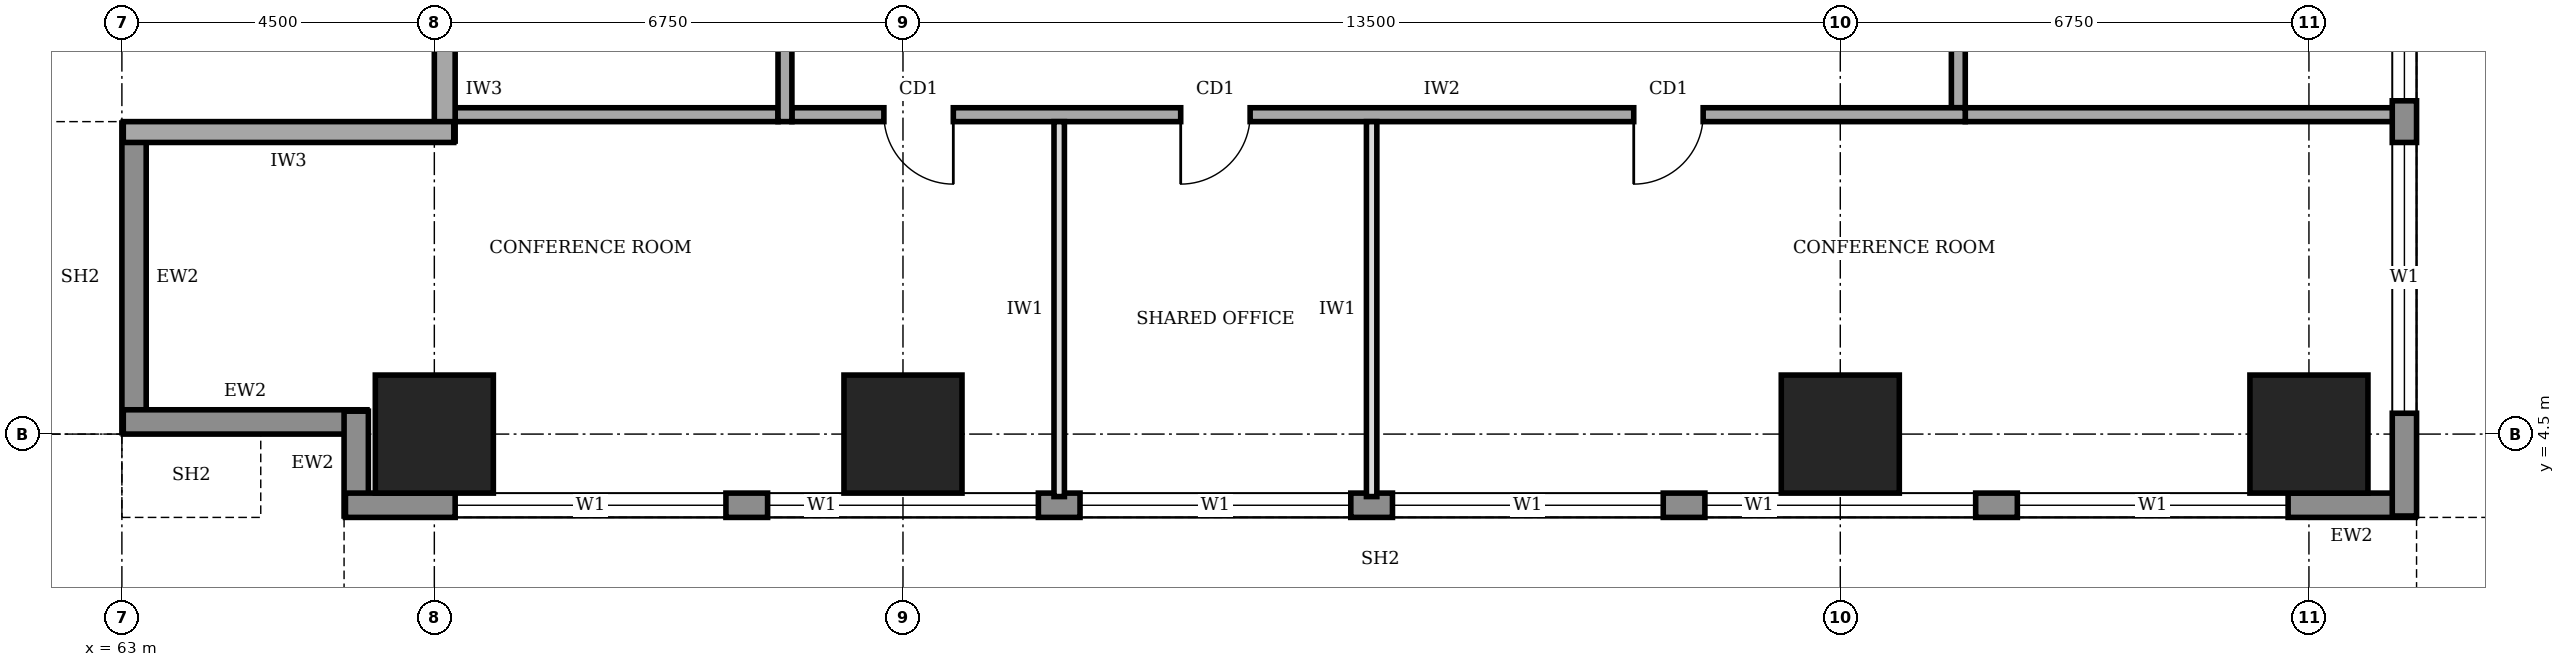
"""IFC4 building model, lengths in metres.
Left out: names, types, materials, properties, quantities, classifications, styles, units other than length and angle.
Written with IfcOpenShell. Run it as: python <this file> out.ifc"""

import sys

from ifc_helpers import new_model, si_unit, direction, frame, frame_2d, origin, origin_2d, place, context, subcontext, project, spatial, rectangle, extrude, element, fill, save


model = new_model("IFC4")
c1 = context("Model", 3, precision=1e-05, world=origin(), true_north=direction((0.0, 1.0)))
c2 = subcontext(c1, "Body", "Model", "MODEL_VIEW")
j1 = project(units=[si_unit("LENGTHUNIT", "METRE"), si_unit("PLANEANGLEUNIT", "RADIAN")], contexts=[c1])
p1 = place(None, origin())
s1 = spatial("IfcSite", under=j1, at=p1, CompositionType="ELEMENT")
p2 = place(p1, origin())
s2 = spatial("IfcBuilding", under=s1, at=p2, CompositionType="ELEMENT")
p3 = place(p2, frame((0.0, 0.0, 129.0)))
s3 = spatial("IfcBuildingStorey", under=s2, at=p3, CompositionType="ELEMENT", Elevation=129.0)
for number, where, z_axis, x_axis in (
    (1, (67.5, 4.5, 0.0), (0.0, 0.0, 1.0), (1.0, 0.0, 0.0)),
    (2, (74.25, 4.5, 0.0), (0.0, 0.0, 1.0), (1.0, 0.0, 0.0)),
    (3, (87.75, 4.5, 0.0), (0.0, 0.0, 1.0), (1.0, 0.0, 0.0)),
    (4, (94.5, 4.5, 0.0), (0.0, 0.0, 1.0), (1.0, 0.0, 0.0)),
):
    element("IfcColumn", number, at=place(p3, frame(where, z_axis=z_axis, x_axis=x_axis)), inside=s3, PredefinedType="COLUMN", context=c2, shape_type="SweptSolid", body=[
        extrude(rectangle(XDim=1.7, YDim=1.7, at=origin_2d()), origin(), (0.0, 0.0, 1.0), 4.0),
    ])
p4 = place(p3, frame((63.175, 8.98, 0.0), z_axis=(0.0, 0.0, 1.0), x_axis=(0.0, -1.0, 0.0)))
e5 = element("IfcWall", 5, at=p4, inside=s3, PredefinedType="STANDARD", context=c2, shape_type="SweptSolid", body=[
    extrude(rectangle(XDim=4.46, YDim=0.35, at=frame_2d((2.23, 0.0))), origin(), (0.0, 0.0, 1.0), 3.75),
])
p5 = place(p3, frame((63.02, 4.675, 0.0), z_axis=(0.0, 0.0, 1.0), x_axis=(1.0, 0.0, 0.0)))
e6 = element("IfcWall", 6, at=p5, inside=s3, PredefinedType="STANDARD", context=c2, shape_type="SweptSolid", body=[
    extrude(rectangle(XDim=3.51, YDim=0.35, at=frame_2d((1.755, 0.0))), origin(), (0.0, 0.0, 1.0), 2.85),
])
p6 = place(p3, frame((66.375, 4.83, 0.0), z_axis=(0.0, 0.0, 1.0), x_axis=(0.0, -1.0, 0.0)))
e7 = element("IfcWall", 7, at=p6, inside=s3, PredefinedType="STANDARD", context=c2, shape_type="SweptSolid", body=[
    extrude(rectangle(XDim=1.51, YDim=0.35, at=frame_2d((0.755, 0.0))), origin(), (0.0, 0.0, 1.0), 3.75),
])
p7 = place(p3, frame((66.22, 3.475, 0.0), z_axis=(0.0, 0.0, 1.0), x_axis=(1.0, 0.0, 0.0)))
e8 = element("IfcWall", 8, at=p7, inside=s3, PredefinedType="STANDARD", context=c2, shape_type="SweptSolid", body=[
    extrude(rectangle(XDim=29.81, YDim=0.35, at=frame_2d((14.905, 0.0))), origin(), (0.0, 0.0, 1.0), 3.75),
])
p8 = place(p7, frame((1.58, 0.0, 0.9)))
e9 = element("IfcOpeningElement", 9, at=p8, cuts=e8, PredefinedType="OPENING", context=c2, shape_type="SweptSolid", body=[
    extrude(rectangle(XDim=3.9, YDim=2.2, at=frame_2d((1.95, 1.1))), frame((0.0, 0.185, 0.0), z_axis=(0.0, -1.0, 0.0), x_axis=(1.0, 0.0, 0.0)), (0.0, 0.0, 1.0), 0.37),
])
p9 = place(p7, frame((6.08, 0.0, 0.9)))
e10 = element("IfcOpeningElement", 10, at=p9, cuts=e8, PredefinedType="OPENING", context=c2, shape_type="SweptSolid", body=[
    extrude(rectangle(XDim=3.9, YDim=2.2, at=frame_2d((1.95, 1.1))), frame((0.0, 0.185, 0.0), z_axis=(0.0, -1.0, 0.0), x_axis=(1.0, 0.0, 0.0)), (0.0, 0.0, 1.0), 0.37),
])
p10 = place(p7, frame((10.58, 0.0, 0.9)))
e11 = element("IfcOpeningElement", 11, at=p10, cuts=e8, PredefinedType="OPENING", context=c2, shape_type="SweptSolid", body=[
    extrude(rectangle(XDim=3.9, YDim=2.2, at=frame_2d((1.95, 1.1))), frame((0.0, 0.185, 0.0), z_axis=(0.0, -1.0, 0.0), x_axis=(1.0, 0.0, 0.0)), (0.0, 0.0, 1.0), 0.37),
])
p11 = place(p7, frame((15.08, 0.0, 0.9)))
e12 = element("IfcOpeningElement", 12, at=p11, cuts=e8, PredefinedType="OPENING", context=c2, shape_type="SweptSolid", body=[
    extrude(rectangle(XDim=3.9, YDim=2.2, at=frame_2d((1.95, 1.1))), frame((0.0, 0.185, 0.0), z_axis=(0.0, -1.0, 0.0), x_axis=(1.0, 0.0, 0.0)), (0.0, 0.0, 1.0), 0.37),
])
p12 = place(p7, frame((19.58, 0.0, 0.9)))
e13 = element("IfcOpeningElement", 13, at=p12, cuts=e8, PredefinedType="OPENING", context=c2, shape_type="SweptSolid", body=[
    extrude(rectangle(XDim=3.9, YDim=2.2, at=frame_2d((1.95, 1.1))), frame((0.0, 0.185, 0.0), z_axis=(0.0, -1.0, 0.0), x_axis=(1.0, 0.0, 0.0)), (0.0, 0.0, 1.0), 0.37),
])
p13 = place(p7, frame((24.08, 0.0, 0.9)))
e14 = element("IfcOpeningElement", 14, at=p13, cuts=e8, PredefinedType="OPENING", context=c2, shape_type="SweptSolid", body=[
    extrude(rectangle(XDim=3.9, YDim=2.2, at=frame_2d((1.95, 1.1))), frame((0.0, 0.185, 0.0), z_axis=(0.0, -1.0, 0.0), x_axis=(1.0, 0.0, 0.0)), (0.0, 0.0, 1.0), 0.37),
])
p14 = place(p3, frame((95.875, 3.32, 0.0), z_axis=(0.0, 0.0, 1.0), x_axis=(0.0, 1.0, 0.0)))
e15 = element("IfcWall", 15, at=p14, inside=s3, PredefinedType="STANDARD", context=c2, shape_type="SweptSolid", body=[
    extrude(rectangle(XDim=33.96, YDim=0.35, at=frame_2d((16.98, 0.0))), origin(), (0.0, 0.0, 1.0), 3.75),
])
p15 = place(p14, frame((1.48, 0.0, 0.9)))
e16 = element("IfcOpeningElement", 16, at=p15, cuts=e15, PredefinedType="OPENING", context=c2, shape_type="SweptSolid", body=[
    extrude(rectangle(XDim=3.9, YDim=2.2, at=frame_2d((1.95, 1.1))), frame((0.0, 0.185, 0.0), z_axis=(0.0, -1.0, 0.0), x_axis=(1.0, 0.0, 0.0)), (0.0, 0.0, 1.0), 0.37),
])
p16 = place(p14, frame((5.98, 0.0, 0.9)))
e17 = element("IfcOpeningElement", 17, at=p16, cuts=e15, PredefinedType="OPENING", context=c2, shape_type="SweptSolid", body=[
    extrude(rectangle(XDim=3.9, YDim=2.2, at=frame_2d((1.95, 1.1))), frame((0.0, 0.185, 0.0), z_axis=(0.0, -1.0, 0.0), x_axis=(1.0, 0.0, 0.0)), (0.0, 0.0, 1.0), 0.37),
])
p17 = place(p14, frame((10.48, 0.0, 0.9)))
e18 = element("IfcOpeningElement", 18, at=p17, cuts=e15, PredefinedType="OPENING", context=c2, shape_type="SweptSolid", body=[
    extrude(rectangle(XDim=3.9, YDim=2.2, at=frame_2d((1.95, 1.1))), frame((0.0, 0.185, 0.0), z_axis=(0.0, -1.0, 0.0), x_axis=(1.0, 0.0, 0.0)), (0.0, 0.0, 1.0), 0.37),
])
p18 = place(p14, frame((14.98, 0.0, 0.9)))
e19 = element("IfcOpeningElement", 19, at=p18, cuts=e15, PredefinedType="OPENING", context=c2, shape_type="SweptSolid", body=[
    extrude(rectangle(XDim=3.9, YDim=2.2, at=frame_2d((1.95, 1.1))), frame((0.0, 0.185, 0.0), z_axis=(0.0, -1.0, 0.0), x_axis=(1.0, 0.0, 0.0)), (0.0, 0.0, 1.0), 0.37),
])
p19 = place(p14, frame((19.48, 0.0, 0.9)))
e20 = element("IfcOpeningElement", 20, at=p19, cuts=e15, PredefinedType="OPENING", context=c2, shape_type="SweptSolid", body=[
    extrude(rectangle(XDim=3.9, YDim=2.2, at=frame_2d((1.95, 1.1))), frame((0.0, 0.185, 0.0), z_axis=(0.0, -1.0, 0.0), x_axis=(1.0, 0.0, 0.0)), (0.0, 0.0, 1.0), 0.37),
])
p20 = place(p14, frame((23.98, 0.0, 0.9)))
e21 = element("IfcOpeningElement", 21, at=p20, cuts=e15, PredefinedType="OPENING", context=c2, shape_type="SweptSolid", body=[
    extrude(rectangle(XDim=3.9, YDim=2.2, at=frame_2d((1.95, 1.1))), frame((0.0, 0.185, 0.0), z_axis=(0.0, -1.0, 0.0), x_axis=(1.0, 0.0, 0.0)), (0.0, 0.0, 1.0), 0.37),
])
p21 = place(p14, frame((28.48, 0.0, 0.9)))
e22 = element("IfcOpeningElement", 22, at=p21, cuts=e15, PredefinedType="OPENING", context=c2, shape_type="SweptSolid", body=[
    extrude(rectangle(XDim=3.9, YDim=2.2, at=frame_2d((1.95, 1.1))), frame((0.0, 0.185, 0.0), z_axis=(0.0, -1.0, 0.0), x_axis=(1.0, 0.0, 0.0)), (0.0, 0.0, 1.0), 0.37),
])
p22 = place(p3, frame((67.65, 10.2, 0.0), z_axis=(0.0, 0.0, 1.0), x_axis=(0.0, -1.0, 0.0)))
e23 = element("IfcWall", 23, at=p22, inside=s3, PredefinedType="SOLIDWALL", context=c2, shape_type="SweptSolid", body=[
    extrude(rectangle(XDim=1.48, YDim=0.3, at=frame_2d((0.74, 0.0))), origin(), (0.0, 0.0, 1.0), 2.65),
])
p23 = place(p3, frame((67.78, 8.85, 0.0), z_axis=(0.0, 0.0, 1.0), x_axis=(-1.0, 0.0, 0.0)))
e24 = element("IfcWall", 24, at=p23, inside=s3, PredefinedType="SOLIDWALL", context=c2, shape_type="SweptSolid", body=[
    extrude(rectangle(XDim=4.76, YDim=0.3, at=frame_2d((2.38, 0.0))), origin(), (0.0, 0.0, 1.0), 3.75),
])
p24 = place(p3, frame((72.65, 9.1, 0.0), z_axis=(0.0, 0.0, 1.0), x_axis=(1.0, 0.0, 0.0)))
e25 = element("IfcWall", 25, at=p24, inside=s3, PredefinedType="SOLIDWALL", context=c2, shape_type="SweptSolid", body=[
    extrude(rectangle(XDim=16.9, YDim=0.2, at=frame_2d((8.45, 0.0))), origin(), (0.0, 0.0, 1.0), 3.75),
])
p25 = place(p24, frame((1.325, 0.0, 0.0)))
e26 = element("IfcOpeningElement", 26, at=p25, cuts=e25, PredefinedType="OPENING", context=c2, shape_type="SweptSolid", body=[
    extrude(rectangle(XDim=1.0, YDim=2.1, at=frame_2d((0.5, 1.05))), frame((0.0, 0.11, 0.0), z_axis=(0.0, -1.0, 0.0), x_axis=(1.0, 0.0, 0.0)), (0.0, 0.0, 1.0), 0.22),
])
p26 = place(p24, frame((5.6, 0.0, 0.0)))
e27 = element("IfcOpeningElement", 27, at=p26, cuts=e25, PredefinedType="OPENING", context=c2, shape_type="SweptSolid", body=[
    extrude(rectangle(XDim=1.0, YDim=2.1, at=frame_2d((0.5, 1.05))), frame((0.0, 0.11, 0.0), z_axis=(0.0, -1.0, 0.0), x_axis=(1.0, 0.0, 0.0)), (0.0, 0.0, 1.0), 0.22),
])
p27 = place(p24, frame((12.125, 0.0, 0.0)))
e28 = element("IfcOpeningElement", 28, at=p27, cuts=e25, PredefinedType="OPENING", context=c2, shape_type="SweptSolid", body=[
    extrude(rectangle(XDim=1.0, YDim=2.1, at=frame_2d((0.5, 1.05))), frame((0.0, 0.11, 0.0), z_axis=(0.0, -1.0, 0.0), x_axis=(1.0, 0.0, 0.0)), (0.0, 0.0, 1.0), 0.22),
])
p28 = place(p3, frame((89.45, 9.2, 0.0), z_axis=(0.0, 0.0, 1.0), x_axis=(0.0, 1.0, 0.0)))
e29 = element("IfcWall", 29, at=p28, inside=s3, PredefinedType="SOLIDWALL", context=c2, shape_type="SweptSolid", body=[
    extrude(rectangle(XDim=22.3, YDim=0.2, at=frame_2d((11.15, 0.0))), origin(), (0.0, 0.0, 1.0), 3.75),
])
p29 = place(p28, frame((1.625, 0.0, 0.0)))
e30 = element("IfcOpeningElement", 30, at=p29, cuts=e29, PredefinedType="OPENING", context=c2, shape_type="SweptSolid", body=[
    extrude(rectangle(XDim=1.0, YDim=2.1, at=frame_2d((0.5, 1.05))), frame((0.0, 0.11, 0.0), z_axis=(0.0, -1.0, 0.0), x_axis=(1.0, 0.0, 0.0)), (0.0, 0.0, 1.0), 0.22),
])
p30 = place(p28, frame((5.825, 0.0, 0.0)))
e31 = element("IfcOpeningElement", 31, at=p30, cuts=e29, PredefinedType="OPENING", context=c2, shape_type="SweptSolid", body=[
    extrude(rectangle(XDim=0.9, YDim=2.1, at=frame_2d((0.45, 1.05))), frame((0.0, 0.11, 0.0), z_axis=(0.0, -1.0, 0.0), x_axis=(1.0, 0.0, 0.0)), (0.0, 0.0, 1.0), 0.22),
])
p31 = place(p28, frame((8.75, 0.0, 0.0)))
e32 = element("IfcOpeningElement", 32, at=p31, cuts=e29, PredefinedType="OPENING", context=c2, shape_type="SweptSolid", body=[
    extrude(rectangle(XDim=0.9, YDim=2.1, at=frame_2d((0.45, 1.05))), frame((0.0, 0.11, 0.0), z_axis=(0.0, -1.0, 0.0), x_axis=(1.0, 0.0, 0.0)), (0.0, 0.0, 1.0), 0.22),
])
p32 = place(p28, frame((13.525, 0.0, 0.0)))
e33 = element("IfcOpeningElement", 33, at=p32, cuts=e29, PredefinedType="OPENING", context=c2, shape_type="SweptSolid", body=[
    extrude(rectangle(XDim=0.9, YDim=2.1, at=frame_2d((0.45, 1.05))), frame((0.0, 0.11, 0.0), z_axis=(0.0, -1.0, 0.0), x_axis=(1.0, 0.0, 0.0)), (0.0, 0.0, 1.0), 0.22),
])
p33 = place(p28, frame((16.15, 0.0, 0.0)))
e34 = element("IfcOpeningElement", 34, at=p33, cuts=e29, PredefinedType="OPENING", context=c2, shape_type="SweptSolid", body=[
    extrude(rectangle(XDim=1.0, YDim=2.1, at=frame_2d((0.5, 1.05))), frame((0.0, 0.11, 0.0), z_axis=(0.0, -1.0, 0.0), x_axis=(1.0, 0.0, 0.0)), (0.0, 0.0, 1.0), 0.22),
])
p34 = place(p28, frame((10.8, 0.0, 0.0)))
e35 = element("IfcOpeningElement", 35, at=p34, cuts=e29, PredefinedType="OPENING", context=c2, shape_type="SweptSolid", body=[
    extrude(rectangle(XDim=1.0, YDim=2.1, at=frame_2d((0.5, 1.05))), frame((0.0, 0.11, 0.0), z_axis=(0.0, -1.0, 0.0), x_axis=(1.0, 0.0, 0.0)), (0.0, 0.0, 1.0), 0.22),
])
p35 = place(p28, frame((19.475, 0.0, 0.0)))
e36 = element("IfcOpeningElement", 36, at=p35, cuts=e29, PredefinedType="OPENING", context=c2, shape_type="SweptSolid", body=[
    extrude(rectangle(XDim=1.0, YDim=2.1, at=frame_2d((0.5, 1.05))), frame((0.0, 0.11, 0.0), z_axis=(0.0, -1.0, 0.0), x_axis=(1.0, 0.0, 0.0)), (0.0, 0.0, 1.0), 0.22),
])
p36 = place(p3, frame((72.55, 31.3, 0.0), z_axis=(0.0, 0.0, 1.0), x_axis=(0.0, -1.0, 0.0)))
e37 = element("IfcWall", 37, at=p36, inside=s3, PredefinedType="SOLIDWALL", context=c2, shape_type="SweptSolid", body=[
    extrude(rectangle(XDim=22.3, YDim=0.2, at=frame_2d((11.15, 0.0))), origin(), (0.0, 0.0, 1.0), 3.75),
])
p37 = place(p36, frame((10.15, 0.0, 0.0)))
e38 = element("IfcOpeningElement", 38, at=p37, cuts=e37, PredefinedType="OPENING", context=c2, shape_type="SweptSolid", body=[
    extrude(rectangle(XDim=1.8, YDim=2.1, at=frame_2d((0.9, 1.05))), frame((0.0, 0.11, 0.0), z_axis=(0.0, -1.0, 0.0), x_axis=(1.0, 0.0, 0.0)), (0.0, 0.0, 1.0), 0.22),
])
p38 = place(p3, frame((67.8, 9.1, 0.0), z_axis=(0.0, 0.0, 1.0), x_axis=(1.0, 0.0, 0.0)))
e39 = element("IfcWall", 39, at=p38, inside=s3, PredefinedType="SOLIDWALL", context=c2, shape_type="SweptSolid", body=[
    extrude(rectangle(XDim=4.65, YDim=0.2, at=frame_2d((2.325, 0.0))), origin(), (0.0, 0.0, 1.0), 3.75),
])
p39 = place(p3, frame((89.55, 9.1, 0.0), z_axis=(0.0, 0.0, 1.0), x_axis=(1.0, 0.0, 0.0)))
e40 = element("IfcWall", 40, at=p39, inside=s3, PredefinedType="SOLIDWALL", context=c2, shape_type="SweptSolid", body=[
    extrude(rectangle(XDim=6.2, YDim=0.2, at=frame_2d((3.1, 0.0))), origin(), (0.0, 0.0, 1.0), 3.75),
])
for number, where, z_axis, x_axis in (
    (41, (76.5, 3.6, 0.0), (0.0, 0.0, 1.0), (0.0, 1.0, 0.0)),
    (42, (81.0, 3.6, 0.0), (0.0, 0.0, 1.0), (0.0, 1.0, 0.0)),
):
    element("IfcWall", number, at=place(p3, frame(where, z_axis=z_axis, x_axis=x_axis)), inside=s3, PredefinedType="PARTITIONING", context=c2, shape_type="SweptSolid", body=[
        extrude(rectangle(XDim=5.4, YDim=0.15, at=frame_2d((2.7, 0.0))), origin(), (0.0, 0.0, 1.0), 3.75),
    ])
p40 = place(p8, origin())
e43 = element("IfcWindow", 43, at=p40, inside=s3, PartitioningType="SINGLE_PANEL", PredefinedType="WINDOW", context=c2, shape_type="SweptSolid", body=[
    extrude(rectangle(XDim=3.9, YDim=2.2, at=frame_2d((1.95, 1.1))), frame((0.0, 0.03, 0.0), z_axis=(0.0, -1.0, 0.0), x_axis=(1.0, 0.0, 0.0)), (0.0, 0.0, 1.0), 0.06),
])
fill(e9, e43)
p41 = place(p9, origin())
e44 = element("IfcWindow", 44, at=p41, inside=s3, PartitioningType="SINGLE_PANEL", PredefinedType="WINDOW", context=c2, shape_type="SweptSolid", body=[
    extrude(rectangle(XDim=3.9, YDim=2.2, at=frame_2d((1.95, 1.1))), frame((0.0, 0.03, 0.0), z_axis=(0.0, -1.0, 0.0), x_axis=(1.0, 0.0, 0.0)), (0.0, 0.0, 1.0), 0.06),
])
fill(e10, e44)
p42 = place(p10, origin())
e45 = element("IfcWindow", 45, at=p42, inside=s3, PartitioningType="SINGLE_PANEL", PredefinedType="WINDOW", context=c2, shape_type="SweptSolid", body=[
    extrude(rectangle(XDim=3.9, YDim=2.2, at=frame_2d((1.95, 1.1))), frame((0.0, 0.03, 0.0), z_axis=(0.0, -1.0, 0.0), x_axis=(1.0, 0.0, 0.0)), (0.0, 0.0, 1.0), 0.06),
])
fill(e11, e45)
p43 = place(p11, origin())
e46 = element("IfcWindow", 46, at=p43, inside=s3, PartitioningType="SINGLE_PANEL", PredefinedType="WINDOW", context=c2, shape_type="SweptSolid", body=[
    extrude(rectangle(XDim=3.9, YDim=2.2, at=frame_2d((1.95, 1.1))), frame((0.0, 0.03, 0.0), z_axis=(0.0, -1.0, 0.0), x_axis=(1.0, 0.0, 0.0)), (0.0, 0.0, 1.0), 0.06),
])
fill(e12, e46)
p44 = place(p12, origin())
e47 = element("IfcWindow", 47, at=p44, inside=s3, PartitioningType="SINGLE_PANEL", PredefinedType="WINDOW", context=c2, shape_type="SweptSolid", body=[
    extrude(rectangle(XDim=3.9, YDim=2.2, at=frame_2d((1.95, 1.1))), frame((0.0, 0.03, 0.0), z_axis=(0.0, -1.0, 0.0), x_axis=(1.0, 0.0, 0.0)), (0.0, 0.0, 1.0), 0.06),
])
fill(e13, e47)
p45 = place(p13, origin())
e48 = element("IfcWindow", 48, at=p45, inside=s3, PartitioningType="SINGLE_PANEL", PredefinedType="WINDOW", context=c2, shape_type="SweptSolid", body=[
    extrude(rectangle(XDim=3.9, YDim=2.2, at=frame_2d((1.95, 1.1))), frame((0.0, 0.03, 0.0), z_axis=(0.0, -1.0, 0.0), x_axis=(1.0, 0.0, 0.0)), (0.0, 0.0, 1.0), 0.06),
])
fill(e14, e48)
p46 = place(p15, origin())
e49 = element("IfcWindow", 49, at=p46, inside=s3, PartitioningType="SINGLE_PANEL", PredefinedType="WINDOW", context=c2, shape_type="SweptSolid", body=[
    extrude(rectangle(XDim=3.9, YDim=2.2, at=frame_2d((1.95, 1.1))), frame((0.0, 0.03, 0.0), z_axis=(0.0, -1.0, 0.0), x_axis=(1.0, 0.0, 0.0)), (0.0, 0.0, 1.0), 0.06),
])
fill(e16, e49)
p47 = place(p16, origin())
e50 = element("IfcWindow", 50, at=p47, inside=s3, PartitioningType="SINGLE_PANEL", PredefinedType="WINDOW", context=c2, shape_type="SweptSolid", body=[
    extrude(rectangle(XDim=3.9, YDim=2.2, at=frame_2d((1.95, 1.1))), frame((0.0, 0.03, 0.0), z_axis=(0.0, -1.0, 0.0), x_axis=(1.0, 0.0, 0.0)), (0.0, 0.0, 1.0), 0.06),
])
fill(e17, e50)
p48 = place(p25, frame((1.0, 0.0, 0.0), z_axis=(0.0, 0.0, 1.0), x_axis=(-1.0, 0.0, 0.0)))
e51 = element("IfcDoor", 51, at=p48, inside=s3, OperationType="SINGLE_SWING_LEFT", PredefinedType="DOOR", context=c2, shape_type="SweptSolid", body=[
    extrude(rectangle(XDim=1.0, YDim=2.1, at=frame_2d((0.5, 1.05))), frame((0.0, 0.025, 0.0), z_axis=(0.0, -1.0, 0.0), x_axis=(1.0, 0.0, 0.0)), (0.0, 0.0, 1.0), 0.05),
])
fill(e26, e51)
p49 = place(p26, frame((1.0, 0.0, 0.0), z_axis=(0.0, 0.0, 1.0), x_axis=(-1.0, 0.0, 0.0)))
e52 = element("IfcDoor", 52, at=p49, inside=s3, OperationType="SINGLE_SWING_RIGHT", PredefinedType="DOOR", context=c2, shape_type="SweptSolid", body=[
    extrude(rectangle(XDim=1.0, YDim=2.1, at=frame_2d((0.5, 1.05))), frame((0.0, 0.025, 0.0), z_axis=(0.0, -1.0, 0.0), x_axis=(1.0, 0.0, 0.0)), (0.0, 0.0, 1.0), 0.05),
])
fill(e27, e52)
p50 = place(p27, frame((1.0, 0.0, 0.0), z_axis=(0.0, 0.0, 1.0), x_axis=(-1.0, 0.0, 0.0)))
e53 = element("IfcDoor", 53, at=p50, inside=s3, OperationType="SINGLE_SWING_RIGHT", PredefinedType="DOOR", context=c2, shape_type="SweptSolid", body=[
    extrude(rectangle(XDim=1.0, YDim=2.1, at=frame_2d((0.5, 1.05))), frame((0.0, 0.025, 0.0), z_axis=(0.0, -1.0, 0.0), x_axis=(1.0, 0.0, 0.0)), (0.0, 0.0, 1.0), 0.05),
])
fill(e28, e53)
save(model, sys.argv[1])
